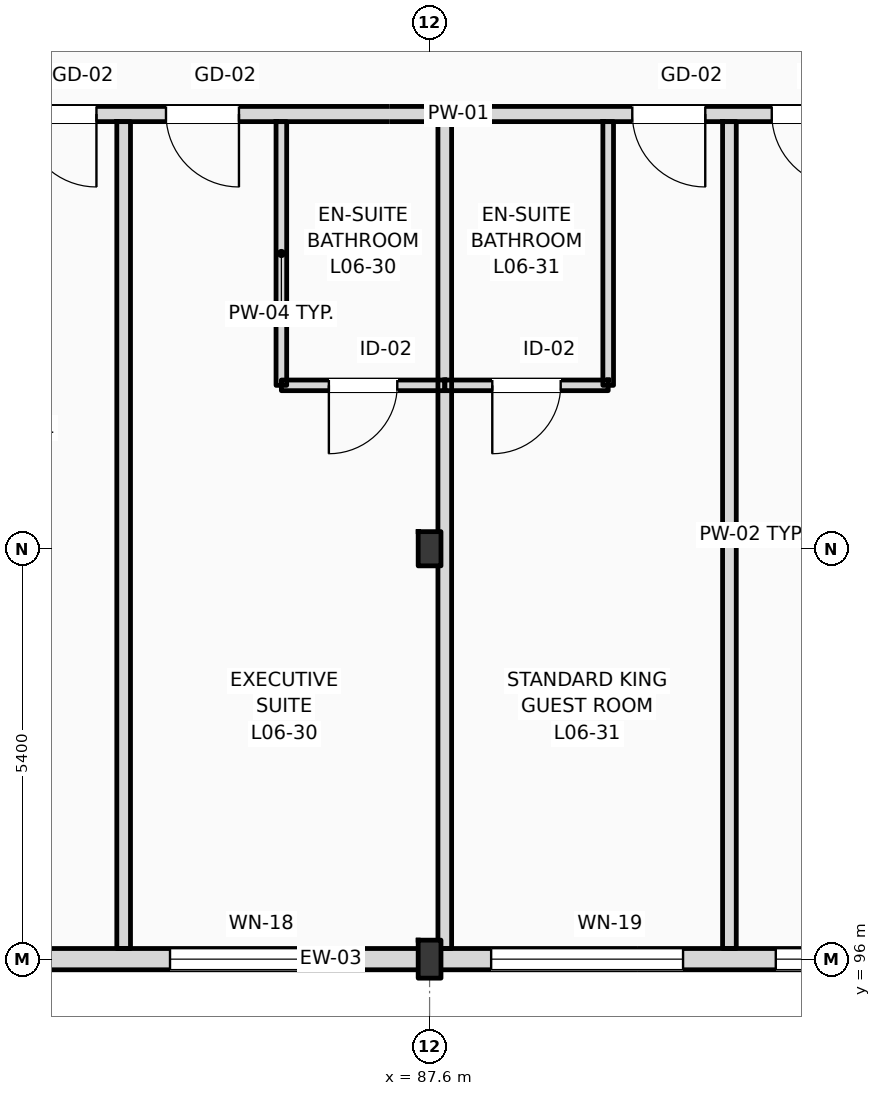
"""IFC4 building model, lengths in metres.
Left out: names, types, materials, properties, quantities, classifications, styles, units other than length and angle.
Written with IfcOpenShell. Run it as: python <this file> out.ifc"""

import sys

from ifc_helpers import new_model, si_unit, direction, frame, frame_2d, origin, origin_2d, place, context, subcontext, project, spatial, rectangle, i_section, extrude, element, fill, save


model = new_model("IFC4")
c1 = context("Model", 3, precision=1e-05, world=origin(), true_north=direction((0.0, 1.0)))
c2 = subcontext(c1, "Body", "Model", "MODEL_VIEW")
j1 = project(units=[si_unit("LENGTHUNIT", "METRE"), si_unit("PLANEANGLEUNIT", "RADIAN")], contexts=[c1])
p1 = place(None, origin())
s1 = spatial("IfcSite", under=j1, at=p1, CompositionType="ELEMENT")
p2 = place(p1, origin())
s2 = spatial("IfcBuilding", under=s1, at=p2, CompositionType="ELEMENT")
p3 = place(p2, frame((0.0, 0.0, 28.2)))
s3 = spatial("IfcBuildingStorey", under=s2, at=p3, CompositionType="ELEMENT", Elevation=28.2)
p4 = place(p3, frame((87.6, 96.0, 0.0), z_axis=(0.0, 0.0, 1.0), x_axis=(1.0, 0.0, 0.0)))
e1 = element("IfcColumn", 1, at=p4, inside=s3, PredefinedType="COLUMN", context=c2, shape_type="SweptSolid", body=[
    extrude(i_section(OverallWidth=0.3, OverallDepth=0.5, WebThickness=0.014, FlangeThickness=0.028, FilletRadius=0.027, at=origin_2d()), origin(), (0.0, 0.0, 1.0), 3.6),
])
p5 = place(p3, frame((87.6, 101.4, 0.0), z_axis=(0.0, 0.0, 1.0), x_axis=(1.0, 0.0, 0.0)))
e2 = element("IfcColumn", 2, at=p5, inside=s3, PredefinedType="COLUMN", context=c2, shape_type="SweptSolid", body=[
    extrude(i_section(OverallWidth=0.3, OverallDepth=0.45, WebThickness=0.014, FlangeThickness=0.026, FilletRadius=0.027, at=origin_2d()), origin(), (0.0, 0.0, 1.0), 3.6),
])
p6 = place(p3, frame((25.2, 96.0, 0.0), z_axis=(0.0, 0.0, 1.0), x_axis=(1.0, 0.0, 0.0)))
e3 = element("IfcWall", 3, at=p6, inside=s3, PredefinedType="STANDARD", context=c2, shape_type="SweptSolid", body=[
    extrude(rectangle(XDim=94.8, YDim=0.28, at=frame_2d((47.4, 0.0))), origin(), (0.0, 0.0, 1.0), 2.8),
])
p7 = place(p6, frame((16.454, 0.0, 0.9)))
e4 = element("IfcOpeningElement", 4, at=p7, cuts=e3, PredefinedType="OPENING", context=c2, shape_type="SweptSolid", body=[
    extrude(rectangle(XDim=2.7, YDim=1.72, at=frame_2d((1.35, 0.86))), frame((0.0, 0.15, 0.0), z_axis=(0.0, -1.0, 0.0), x_axis=(1.0, 0.0, 0.0)), (0.0, 0.0, 1.0), 0.3),
])
p8 = place(p6, frame((20.068, 0.0, 0.9)))
e5 = element("IfcOpeningElement", 5, at=p8, cuts=e3, PredefinedType="OPENING", context=c2, shape_type="SweptSolid", body=[
    extrude(rectangle(XDim=2.389, YDim=1.72, at=frame_2d((1.194, 0.86))), frame((0.0, 0.15, 0.0), z_axis=(0.0, -1.0, 0.0), x_axis=(1.0, 0.0, 0.0)), (0.0, 0.0, 1.0), 0.3),
])
p9 = place(p6, frame((24.277, 0.0, 0.9)))
e6 = element("IfcOpeningElement", 6, at=p9, cuts=e3, PredefinedType="OPENING", context=c2, shape_type="SweptSolid", body=[
    extrude(rectangle(XDim=1.8, YDim=1.72, at=frame_2d((0.9, 0.86))), frame((0.0, 0.15, 0.0), z_axis=(0.0, -1.0, 0.0), x_axis=(1.0, 0.0, 0.0)), (0.0, 0.0, 1.0), 0.3),
])
p10 = place(p6, frame((27.885, 0.0, 0.9)))
e7 = element("IfcOpeningElement", 7, at=p10, cuts=e3, PredefinedType="OPENING", context=c2, shape_type="SweptSolid", body=[
    extrude(rectangle(XDim=2.388, YDim=1.72, at=frame_2d((1.194, 0.86))), frame((0.0, 0.15, 0.0), z_axis=(0.0, -1.0, 0.0), x_axis=(1.0, 0.0, 0.0)), (0.0, 0.0, 1.0), 0.3),
])
p11 = place(p6, frame((32.093, 0.0, 0.9)))
e8 = element("IfcOpeningElement", 8, at=p11, cuts=e3, PredefinedType="OPENING", context=c2, shape_type="SweptSolid", body=[
    extrude(rectangle(XDim=1.8, YDim=1.72, at=frame_2d((0.9, 0.86))), frame((0.0, 0.15, 0.0), z_axis=(0.0, -1.0, 0.0), x_axis=(1.0, 0.0, 0.0)), (0.0, 0.0, 1.0), 0.3),
])
p12 = place(p6, frame((35.702, 0.0, 0.9)))
e9 = element("IfcOpeningElement", 9, at=p12, cuts=e3, PredefinedType="OPENING", context=c2, shape_type="SweptSolid", body=[
    extrude(rectangle(XDim=2.488, YDim=1.72, at=frame_2d((1.244, 0.86))), frame((0.0, 0.15, 0.0), z_axis=(0.0, -1.0, 0.0), x_axis=(1.0, 0.0, 0.0)), (0.0, 0.0, 1.0), 0.3),
])
p13 = place(p6, frame((55.56, 0.0, 0.9)))
e10 = element("IfcOpeningElement", 10, at=p13, cuts=e3, PredefinedType="OPENING", context=c2, shape_type="SweptSolid", body=[
    extrude(rectangle(XDim=1.8, YDim=1.72, at=frame_2d((0.9, 0.86))), frame((0.0, 0.15, 0.0), z_axis=(0.0, -1.0, 0.0), x_axis=(1.0, 0.0, 0.0)), (0.0, 0.0, 1.0), 0.3),
])
p14 = place(p6, frame((58.985, 0.0, 0.9)))
e11 = element("IfcOpeningElement", 11, at=p14, cuts=e3, PredefinedType="OPENING", context=c2, shape_type="SweptSolid", body=[
    extrude(rectangle(XDim=1.8, YDim=1.72, at=frame_2d((0.9, 0.86))), frame((0.0, 0.15, 0.0), z_axis=(0.0, -1.0, 0.0), x_axis=(1.0, 0.0, 0.0)), (0.0, 0.0, 1.0), 0.3),
])
p15 = place(p6, frame((63.21, 0.0, 0.9)))
e12 = element("IfcOpeningElement", 12, at=p15, cuts=e3, PredefinedType="OPENING", context=c2, shape_type="SweptSolid", body=[
    extrude(rectangle(XDim=2.525, YDim=1.72, at=frame_2d((1.262, 0.86))), frame((0.0, 0.15, 0.0), z_axis=(0.0, -1.0, 0.0), x_axis=(1.0, 0.0, 0.0)), (0.0, 0.0, 1.0), 0.3),
])
p16 = place(p6, frame((66.955, 0.0, 0.9)))
e13 = element("IfcOpeningElement", 13, at=p16, cuts=e3, PredefinedType="OPENING", context=c2, shape_type="SweptSolid", body=[
    extrude(rectangle(XDim=1.8, YDim=1.72, at=frame_2d((0.9, 0.86))), frame((0.0, 0.15, 0.0), z_axis=(0.0, -1.0, 0.0), x_axis=(1.0, 0.0, 0.0)), (0.0, 0.0, 1.0), 0.3),
])
p17 = place(p6, frame((71.892, 0.0, 0.9)))
e14 = element("IfcOpeningElement", 14, at=p17, cuts=e3, PredefinedType="OPENING", context=c2, shape_type="SweptSolid", body=[
    extrude(rectangle(XDim=1.1, YDim=1.5, at=frame_2d((0.55, 0.75))), frame((0.0, 0.15, 0.0), z_axis=(0.0, -1.0, 0.0), x_axis=(1.0, 0.0, 0.0)), (0.0, 0.0, 1.0), 0.3),
])
p18 = place(p6, frame((75.802, 0.0, 0.9)))
e15 = element("IfcOpeningElement", 15, at=p18, cuts=e3, PredefinedType="OPENING", context=c2, shape_type="SweptSolid", body=[
    extrude(rectangle(XDim=1.25, YDim=1.6, at=frame_2d((0.625, 0.8))), frame((0.0, 0.15, 0.0), z_axis=(0.0, -1.0, 0.0), x_axis=(1.0, 0.0, 0.0)), (0.0, 0.0, 1.0), 0.3),
])
p19 = place(p6, frame((79.712, 0.0, 0.9)))
e16 = element("IfcOpeningElement", 16, at=p19, cuts=e3, PredefinedType="OPENING", context=c2, shape_type="SweptSolid", body=[
    extrude(rectangle(XDim=1.4, YDim=1.7, at=frame_2d((0.7, 0.85))), frame((0.0, 0.15, 0.0), z_axis=(0.0, -1.0, 0.0), x_axis=(1.0, 0.0, 0.0)), (0.0, 0.0, 1.0), 0.3),
])
p20 = place(p6, frame((83.597, 0.0, 0.9)))
e17 = element("IfcOpeningElement", 17, at=p20, cuts=e3, PredefinedType="OPENING", context=c2, shape_type="SweptSolid", body=[
    extrude(rectangle(XDim=1.6, YDim=1.72, at=frame_2d((0.8, 0.86))), frame((0.0, 0.15, 0.0), z_axis=(0.0, -1.0, 0.0), x_axis=(1.0, 0.0, 0.0)), (0.0, 0.0, 1.0), 0.3),
])
p21 = place(p6, frame((87.507, 0.0, 0.9)))
e18 = element("IfcOpeningElement", 18, at=p21, cuts=e3, PredefinedType="OPENING", context=c2, shape_type="SweptSolid", body=[
    extrude(rectangle(XDim=1.75, YDim=1.72, at=frame_2d((0.875, 0.86))), frame((0.0, 0.15, 0.0), z_axis=(0.0, -1.0, 0.0), x_axis=(1.0, 0.0, 0.0)), (0.0, 0.0, 1.0), 0.3),
])
p22 = place(p6, frame((91.328, 0.0, 0.9)))
e19 = element("IfcOpeningElement", 19, at=p22, cuts=e3, PredefinedType="OPENING", context=c2, shape_type="SweptSolid", body=[
    extrude(rectangle(XDim=2.0, YDim=1.72, at=frame_2d((1.0, 0.86))), frame((0.0, 0.15, 0.0), z_axis=(0.0, -1.0, 0.0), x_axis=(1.0, 0.0, 0.0)), (0.0, 0.0, 1.0), 0.3),
])
p23 = place(p3, frame((79.76, 107.12, 0.0), z_axis=(0.0, 0.0, 1.0), x_axis=(1.0, 0.0, 0.0)))
e20 = element("IfcWall", 20, at=p23, inside=s3, PredefinedType="PARTITIONING", context=c2, shape_type="SweptSolid", body=[
    extrude(rectangle(XDim=40.1, YDim=0.2, at=frame_2d((20.05, 0.0))), origin(), (0.0, 0.0, 1.0), 3.36),
])
p24 = place(p23, frame((2.497, 0.0, 0.0)))
e21 = element("IfcOpeningElement", 21, at=p24, cuts=e20, PredefinedType="OPENING", context=c2, shape_type="SweptSolid", body=[
    extrude(rectangle(XDim=0.96, YDim=2.2, at=frame_2d((0.48, 1.1))), frame((0.0, 0.11, 0.0), z_axis=(0.0, -1.0, 0.0), x_axis=(1.0, 0.0, 0.0)), (0.0, 0.0, 1.0), 0.22),
])
p25 = place(p23, frame((4.372, 0.0, 0.0)))
e22 = element("IfcOpeningElement", 22, at=p25, cuts=e20, PredefinedType="OPENING", context=c2, shape_type="SweptSolid", body=[
    extrude(rectangle(XDim=0.96, YDim=2.2, at=frame_2d((0.48, 1.1))), frame((0.0, 0.11, 0.0), z_axis=(0.0, -1.0, 0.0), x_axis=(1.0, 0.0, 0.0)), (0.0, 0.0, 1.0), 0.22),
])
p26 = place(p23, frame((10.507, 0.0, 0.0)))
e23 = element("IfcOpeningElement", 23, at=p26, cuts=e20, PredefinedType="OPENING", context=c2, shape_type="SweptSolid", body=[
    extrude(rectangle(XDim=0.96, YDim=2.2, at=frame_2d((0.48, 1.1))), frame((0.0, 0.11, 0.0), z_axis=(0.0, -1.0, 0.0), x_axis=(1.0, 0.0, 0.0)), (0.0, 0.0, 1.0), 0.22),
])
p27 = place(p23, frame((12.342, 0.0, 0.0)))
e24 = element("IfcOpeningElement", 24, at=p27, cuts=e20, PredefinedType="OPENING", context=c2, shape_type="SweptSolid", body=[
    extrude(rectangle(XDim=0.96, YDim=2.2, at=frame_2d((0.48, 1.1))), frame((0.0, 0.11, 0.0), z_axis=(0.0, -1.0, 0.0), x_axis=(1.0, 0.0, 0.0)), (0.0, 0.0, 1.0), 0.22),
])
p28 = place(p23, frame((18.477, 0.0, 0.0)))
e25 = element("IfcOpeningElement", 25, at=p28, cuts=e20, PredefinedType="OPENING", context=c2, shape_type="SweptSolid", body=[
    extrude(rectangle(XDim=0.96, YDim=2.2, at=frame_2d((0.48, 1.1))), frame((0.0, 0.11, 0.0), z_axis=(0.0, -1.0, 0.0), x_axis=(1.0, 0.0, 0.0)), (0.0, 0.0, 1.0), 0.22),
])
p29 = place(p23, frame((20.312, 0.0, 0.0)))
e26 = element("IfcOpeningElement", 26, at=p29, cuts=e20, PredefinedType="OPENING", context=c2, shape_type="SweptSolid", body=[
    extrude(rectangle(XDim=0.96, YDim=2.2, at=frame_2d((0.48, 1.1))), frame((0.0, 0.11, 0.0), z_axis=(0.0, -1.0, 0.0), x_axis=(1.0, 0.0, 0.0)), (0.0, 0.0, 1.0), 0.22),
])
p30 = place(p23, frame((26.447, 0.0, 0.0)))
e27 = element("IfcOpeningElement", 27, at=p30, cuts=e20, PredefinedType="OPENING", context=c2, shape_type="SweptSolid", body=[
    extrude(rectangle(XDim=0.96, YDim=2.2, at=frame_2d((0.48, 1.1))), frame((0.0, 0.11, 0.0), z_axis=(0.0, -1.0, 0.0), x_axis=(1.0, 0.0, 0.0)), (0.0, 0.0, 1.0), 0.22),
])
p31 = place(p23, frame((28.282, 0.0, 0.0)))
e28 = element("IfcOpeningElement", 28, at=p31, cuts=e20, PredefinedType="OPENING", context=c2, shape_type="SweptSolid", body=[
    extrude(rectangle(XDim=0.96, YDim=2.2, at=frame_2d((0.48, 1.1))), frame((0.0, 0.11, 0.0), z_axis=(0.0, -1.0, 0.0), x_axis=(1.0, 0.0, 0.0)), (0.0, 0.0, 1.0), 0.22),
])
p32 = place(p23, frame((34.417, 0.0, 0.0)))
e29 = element("IfcOpeningElement", 29, at=p32, cuts=e20, PredefinedType="OPENING", context=c2, shape_type="SweptSolid", body=[
    extrude(rectangle(XDim=0.96, YDim=2.2, at=frame_2d((0.48, 1.1))), frame((0.0, 0.11, 0.0), z_axis=(0.0, -1.0, 0.0), x_axis=(1.0, 0.0, 0.0)), (0.0, 0.0, 1.0), 0.22),
])
p33 = place(p23, frame((36.212, 0.0, 0.0)))
e30 = element("IfcOpeningElement", 30, at=p33, cuts=e20, PredefinedType="OPENING", context=c2, shape_type="SweptSolid", body=[
    extrude(rectangle(XDim=0.96, YDim=2.2, at=frame_2d((0.48, 1.1))), frame((0.0, 0.11, 0.0), z_axis=(0.0, -1.0, 0.0), x_axis=(1.0, 0.0, 0.0)), (0.0, 0.0, 1.0), 0.22),
])
p34 = place(p3, frame((83.575, 96.14, 0.0), z_axis=(0.0, 0.0, 1.0), x_axis=(0.0, 1.0, 0.0)))
e31 = element("IfcWall", 31, at=p34, inside=s3, PredefinedType="PARTITIONING", context=c2, shape_type="SweptSolid", body=[
    extrude(rectangle(XDim=10.88, YDim=0.18, at=frame_2d((5.44, 0.0))), origin(), (0.0, 0.0, 1.0), 3.36),
])
p35 = place(p3, frame((87.8, 96.14, 0.0), z_axis=(0.0, 0.0, 1.0), x_axis=(0.0, 1.0, 0.0)))
e32 = element("IfcWall", 32, at=p35, inside=s3, PredefinedType="PARTITIONING", context=c2, shape_type="SweptSolid", body=[
    extrude(rectangle(XDim=10.88, YDim=0.18, at=frame_2d((5.44, 0.0))), origin(), (0.0, 0.0, 1.0), 2.99),
])
p36 = place(p3, frame((85.65, 103.55, 0.0), z_axis=(0.0, 0.0, 1.0), x_axis=(0.0, 1.0, 0.0)))
e33 = element("IfcWall", 33, at=p36, inside=s3, PredefinedType="PARTITIONING", context=c2, shape_type="SweptSolid", body=[
    extrude(rectangle(XDim=3.47, YDim=0.14, at=frame_2d((1.735, 0.0))), origin(), (0.0, 0.0, 1.0), 3.36),
])
p37 = place(p3, frame((85.65, 103.55, 0.0), z_axis=(0.0, 0.0, 1.0), x_axis=(1.0, 0.0, 0.0)))
e34 = element("IfcWall", 34, at=p37, inside=s3, PredefinedType="PARTITIONING", context=c2, shape_type="SweptSolid", body=[
    extrude(rectangle(XDim=2.15, YDim=0.14, at=frame_2d((1.075, 0.0))), origin(), (0.0, 0.0, 1.0), 3.36),
])
p38 = place(p37, frame((0.625, 0.0, 0.0)))
e35 = element("IfcOpeningElement", 35, at=p38, cuts=e34, PredefinedType="OPENING", context=c2, shape_type="SweptSolid", body=[
    extrude(rectangle(XDim=0.9, YDim=2.1, at=frame_2d((0.45, 1.05))), frame((0.0, 0.08, 0.0), z_axis=(0.0, -1.0, 0.0), x_axis=(1.0, 0.0, 0.0)), (0.0, 0.0, 1.0), 0.16),
])
p39 = place(p3, frame((91.545, 96.14, 0.0), z_axis=(0.0, 0.0, 1.0), x_axis=(0.0, 1.0, 0.0)))
e36 = element("IfcWall", 36, at=p39, inside=s3, PredefinedType="PARTITIONING", context=c2, shape_type="SweptSolid", body=[
    extrude(rectangle(XDim=10.88, YDim=0.18, at=frame_2d((5.44, 0.0))), origin(), (0.0, 0.0, 1.0), 3.36),
])
p40 = place(p3, frame((89.95, 103.55, 0.0), z_axis=(0.0, 0.0, 1.0), x_axis=(0.0, 1.0, 0.0)))
e37 = element("IfcWall", 37, at=p40, inside=s3, PredefinedType="PARTITIONING", context=c2, shape_type="SweptSolid", body=[
    extrude(rectangle(XDim=3.47, YDim=0.14, at=frame_2d((1.735, 0.0))), origin(), (0.0, 0.0, 1.0), 3.36),
])
p41 = place(p3, frame((87.8, 103.55, 0.0), z_axis=(0.0, 0.0, 1.0), x_axis=(1.0, 0.0, 0.0)))
e38 = element("IfcWall", 38, at=p41, inside=s3, PredefinedType="PARTITIONING", context=c2, shape_type="SweptSolid", body=[
    extrude(rectangle(XDim=2.15, YDim=0.14, at=frame_2d((1.075, 0.0))), origin(), (0.0, 0.0, 1.0), 3.36),
])
p42 = place(p41, frame((0.625, 0.0, 0.0)))
e39 = element("IfcOpeningElement", 39, at=p42, cuts=e38, PredefinedType="OPENING", context=c2, shape_type="SweptSolid", body=[
    extrude(rectangle(XDim=0.9, YDim=2.1, at=frame_2d((0.45, 1.05))), frame((0.0, 0.08, 0.0), z_axis=(0.0, -1.0, 0.0), x_axis=(1.0, 0.0, 0.0)), (0.0, 0.0, 1.0), 0.16),
])
p43 = place(p14, origin())
e40 = element("IfcWindow", 40, at=p43, inside=s3, PartitioningType="DOUBLE_PANEL_VERTICAL", PredefinedType="WINDOW", context=c2, shape_type="SweptSolid", body=[
    extrude(rectangle(XDim=1.8, YDim=1.72, at=frame_2d((0.9, 0.86))), frame((0.0, 0.03, 0.0), z_axis=(0.0, -1.0, 0.0), x_axis=(1.0, 0.0, 0.0)), (0.0, 0.0, 1.0), 0.06),
])
fill(e11, e40)
p44 = place(p15, origin())
e41 = element("IfcWindow", 41, at=p44, inside=s3, PartitioningType="DOUBLE_PANEL_VERTICAL", PredefinedType="WINDOW", context=c2, shape_type="SweptSolid", body=[
    extrude(rectangle(XDim=2.525, YDim=1.72, at=frame_2d((1.262, 0.86))), frame((0.0, 0.03, 0.0), z_axis=(0.0, -1.0, 0.0), x_axis=(1.0, 0.0, 0.0)), (0.0, 0.0, 1.0), 0.06),
])
fill(e12, e41)
p45 = place(p16, origin())
e42 = element("IfcWindow", 42, at=p45, inside=s3, PartitioningType="DOUBLE_PANEL_VERTICAL", PredefinedType="WINDOW", context=c2, shape_type="SweptSolid", body=[
    extrude(rectangle(XDim=1.8, YDim=1.72, at=frame_2d((0.9, 0.86))), frame((0.0, 0.03, 0.0), z_axis=(0.0, -1.0, 0.0), x_axis=(1.0, 0.0, 0.0)), (0.0, 0.0, 1.0), 0.06),
])
fill(e13, e42)
p46 = place(p24, frame((0.96, 0.0, 0.0), z_axis=(0.0, 0.0, 1.0), x_axis=(-1.0, 0.0, 0.0)))
e43 = element("IfcDoor", 43, at=p46, inside=s3, OperationType="SINGLE_SWING_RIGHT", PredefinedType="DOOR", context=c2, shape_type="SweptSolid", body=[
    extrude(rectangle(XDim=0.96, YDim=2.2, at=frame_2d((0.48, 1.1))), frame((0.0, 0.025, 0.0), z_axis=(0.0, -1.0, 0.0), x_axis=(1.0, 0.0, 0.0)), (0.0, 0.0, 1.0), 0.05),
])
fill(e21, e43)
p47 = place(p25, frame((0.96, 0.0, 0.0), z_axis=(0.0, 0.0, 1.0), x_axis=(-1.0, 0.0, 0.0)))
e44 = element("IfcDoor", 44, at=p47, inside=s3, OperationType="SINGLE_SWING_RIGHT", PredefinedType="DOOR", context=c2, shape_type="SweptSolid", body=[
    extrude(rectangle(XDim=0.96, YDim=2.2, at=frame_2d((0.48, 1.1))), frame((0.0, 0.025, 0.0), z_axis=(0.0, -1.0, 0.0), x_axis=(1.0, 0.0, 0.0)), (0.0, 0.0, 1.0), 0.05),
])
fill(e22, e44)
p48 = place(p38, frame((0.9, 0.0, 0.0), z_axis=(0.0, 0.0, 1.0), x_axis=(-1.0, 0.0, 0.0)))
e45 = element("IfcDoor", 45, at=p48, inside=s3, OperationType="SINGLE_SWING_LEFT", PredefinedType="DOOR", context=c2, shape_type="SweptSolid", body=[
    extrude(rectangle(XDim=0.9, YDim=2.1, at=frame_2d((0.45, 1.05))), frame((0.0, 0.025, 0.0), z_axis=(0.0, -1.0, 0.0), x_axis=(1.0, 0.0, 0.0)), (0.0, 0.0, 1.0), 0.05),
])
fill(e35, e45)
p49 = place(p26, frame((0.96, 0.0, 0.0), z_axis=(0.0, 0.0, 1.0), x_axis=(-1.0, 0.0, 0.0)))
e46 = element("IfcDoor", 46, at=p49, inside=s3, OperationType="SINGLE_SWING_RIGHT", PredefinedType="DOOR", context=c2, shape_type="SweptSolid", body=[
    extrude(rectangle(XDim=0.96, YDim=2.2, at=frame_2d((0.48, 1.1))), frame((0.0, 0.025, 0.0), z_axis=(0.0, -1.0, 0.0), x_axis=(1.0, 0.0, 0.0)), (0.0, 0.0, 1.0), 0.05),
])
fill(e23, e46)
p50 = place(p42, frame((0.9, 0.0, 0.0), z_axis=(0.0, 0.0, 1.0), x_axis=(-1.0, 0.0, 0.0)))
e47 = element("IfcDoor", 47, at=p50, inside=s3, OperationType="SINGLE_SWING_LEFT", PredefinedType="DOOR", context=c2, shape_type="SweptSolid", body=[
    extrude(rectangle(XDim=0.9, YDim=2.1, at=frame_2d((0.45, 1.05))), frame((0.0, 0.025, 0.0), z_axis=(0.0, -1.0, 0.0), x_axis=(1.0, 0.0, 0.0)), (0.0, 0.0, 1.0), 0.05),
])
fill(e39, e47)
p51 = place(p27, frame((0.96, 0.0, 0.0), z_axis=(0.0, 0.0, 1.0), x_axis=(-1.0, 0.0, 0.0)))
e48 = element("IfcDoor", 48, at=p51, inside=s3, OperationType="SINGLE_SWING_RIGHT", PredefinedType="DOOR", context=c2, shape_type="SweptSolid", body=[
    extrude(rectangle(XDim=0.96, YDim=2.2, at=frame_2d((0.48, 1.1))), frame((0.0, 0.025, 0.0), z_axis=(0.0, -1.0, 0.0), x_axis=(1.0, 0.0, 0.0)), (0.0, 0.0, 1.0), 0.05),
])
fill(e24, e48)
save(model, sys.argv[1])
